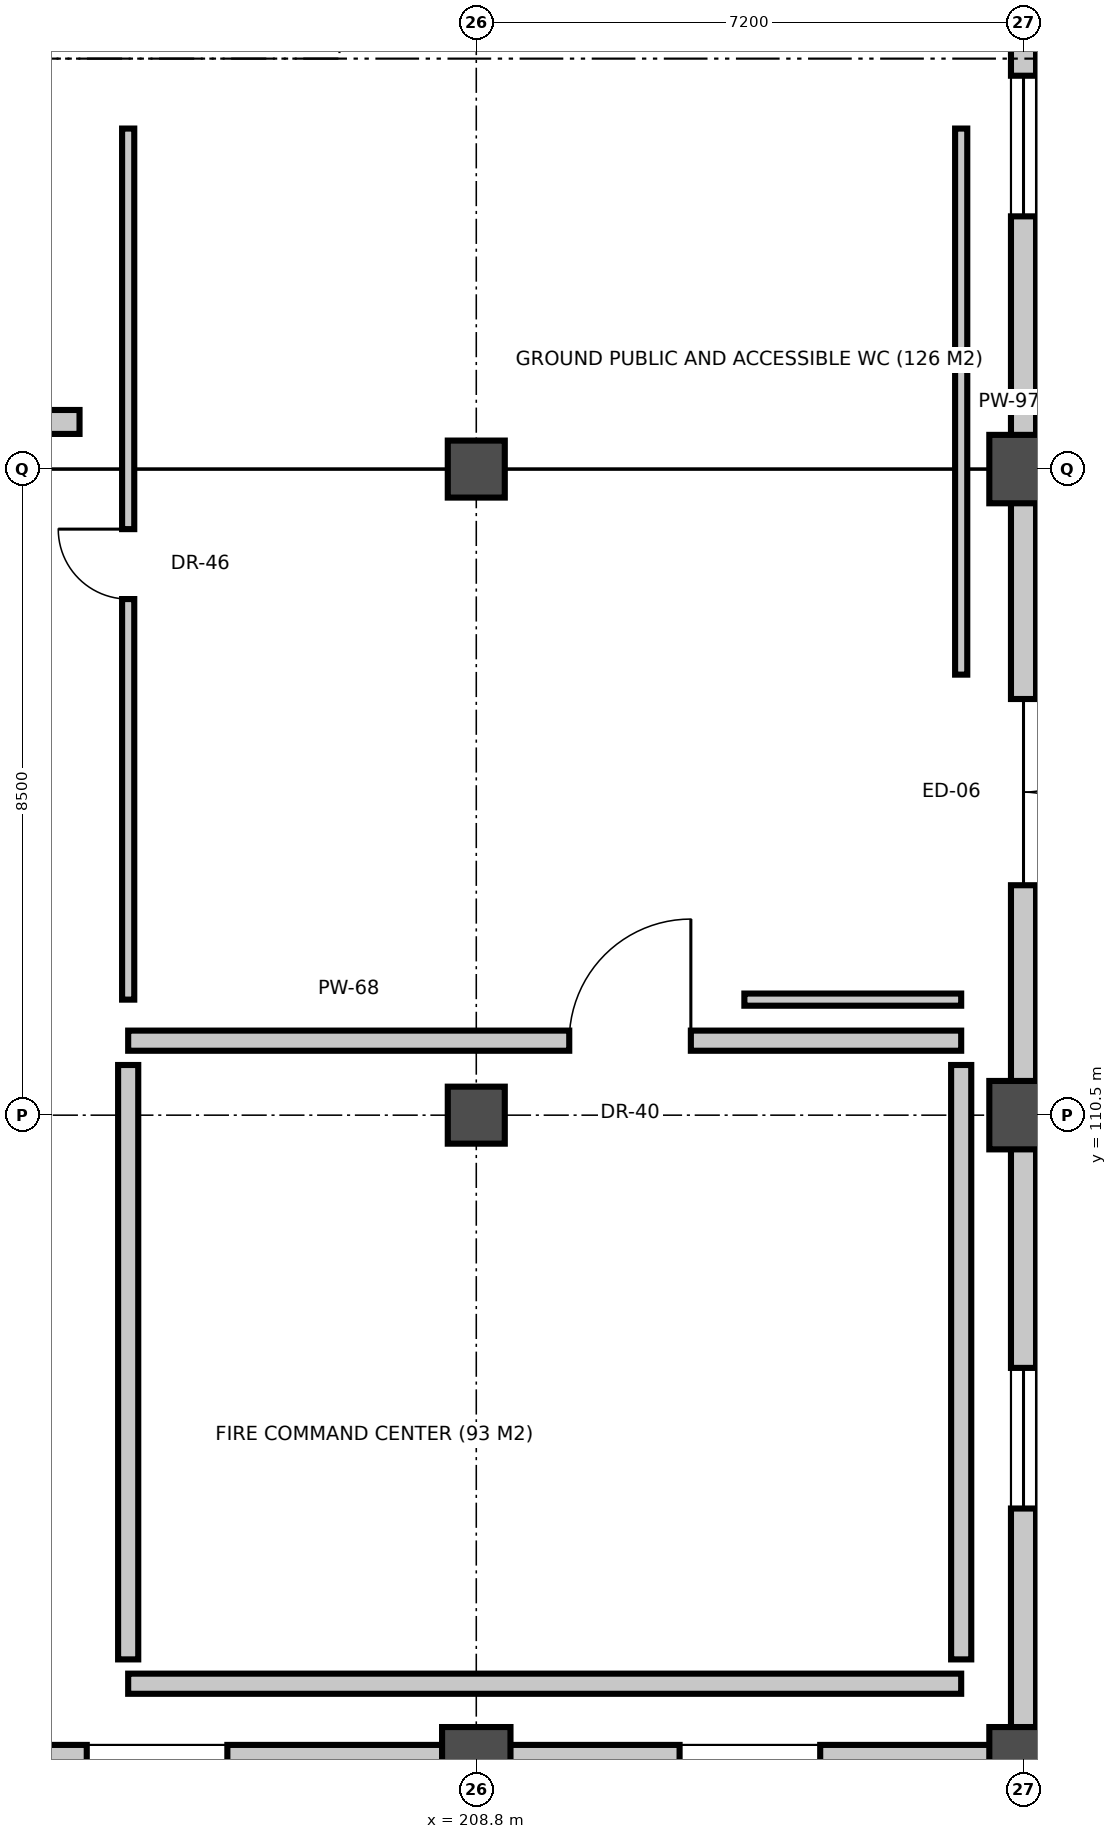
"""IFC4 building model, lengths in metres.
Left out: names, types, materials, properties, quantities, classifications, styles, units other than length and angle.
Written with IfcOpenShell. Run it as: python <this file> out.ifc"""

import sys

from ifc_helpers import new_model, si_unit, direction, frame, frame_2d, origin, origin_2d, place, context, subcontext, project, spatial, rectangle, circle, extrude, element, fill, save


model = new_model("IFC4")
c1 = context("Model", 3, precision=1e-05, world=origin(), true_north=direction((0.0, 1.0)))
c2 = subcontext(c1, "Body", "Model", "MODEL_VIEW")
j1 = project(units=[si_unit("LENGTHUNIT", "METRE"), si_unit("PLANEANGLEUNIT", "RADIAN")], contexts=[c1])
p1 = place(None, origin())
s1 = spatial("IfcSite", under=j1, at=p1, CompositionType="ELEMENT")
p2 = place(p1, origin())
s2 = spatial("IfcBuilding", under=s1, at=p2, CompositionType="ELEMENT")
p3 = place(p2, origin())
s3 = spatial("IfcBuildingStorey", under=s2, at=p3, CompositionType="ELEMENT", Elevation=0.0)
p4 = place(p3, frame((208.8, 102.0, 0.0), z_axis=(0.0, 0.0, 1.0), x_axis=(1.0, 0.0, 0.0)))
e1 = element("IfcColumn", 1, at=p4, inside=s3, PredefinedType="COLUMN", context=c2, shape_type="SweptSolid", body=[
    extrude(circle(Radius=0.45, at=origin_2d()), origin(), (0.0, 0.0, 1.0), 5.4),
])
for number, where, z_axis, x_axis in (
    (2, (208.8, 110.5, 0.0), (0.0, 0.0, 1.0), (1.0, 0.0, 0.0)),
    (3, (208.8, 119.0, 0.0), (0.0, 0.0, 1.0), (1.0, 0.0, 0.0)),
):
    element("IfcColumn", number, at=place(p3, frame(where, z_axis=z_axis, x_axis=x_axis)), inside=s3, PredefinedType="COLUMN", context=c2, shape_type="SweptSolid", body=[
        extrude(rectangle(XDim=0.75, YDim=0.75, at=origin_2d()), origin(), (0.0, 0.0, 1.0), 5.4),
    ])
for number, where, z_axis, x_axis in (
    (4, (216.0, 102.0, 0.0), (0.0, 0.0, 1.0), (1.0, 0.0, 0.0)),
    (5, (216.0, 110.5, 0.0), (0.0, 0.0, 1.0), (1.0, 0.0, 0.0)),
    (6, (216.0, 119.0, 0.0), (0.0, 0.0, 1.0), (1.0, 0.0, 0.0)),
):
    element("IfcColumn", number, at=place(p3, frame(where, z_axis=z_axis, x_axis=x_axis)), inside=s3, PredefinedType="COLUMN", context=c2, shape_type="SweptSolid", body=[
        extrude(circle(Radius=0.45, at=origin_2d()), origin(), (0.0, 0.0, 1.0), 5.4),
    ])
p5 = place(p3, frame((216.0, 127.07, 0.0), z_axis=(0.0, 0.0, 1.0), x_axis=(0.0, -1.0, 0.0)))
e7 = element("IfcWall", 7, at=p5, inside=s3, PredefinedType="SOLIDWALL", context=c2, shape_type="SweptSolid", body=[
    extrude(rectangle(XDim=7.64, YDim=0.33, at=frame_2d((3.82, 0.0))), origin(), (0.0, 0.0, 1.0), 4.078),
])
p6 = place(p5, frame((2.895, 0.0, 1.0)))
e8 = element("IfcOpeningElement", 8, at=p6, cuts=e7, PredefinedType="OPENING", context=c2, shape_type="SweptSolid", body=[
    extrude(rectangle(XDim=1.85, YDim=2.1, at=frame_2d((0.925, 1.05))), frame((0.0, 0.175, 0.0), z_axis=(0.0, -1.0, 0.0), x_axis=(1.0, 0.0, 0.0)), (0.0, 0.0, 1.0), 0.35),
])
p7 = place(p3, frame((216.0, 110.07, 0.0), z_axis=(0.0, 0.0, 1.0), x_axis=(0.0, -1.0, 0.0)))
e9 = element("IfcWall", 9, at=p7, inside=s3, PredefinedType="SOLIDWALL", context=c2, shape_type="SweptSolid", body=[
    extrude(rectangle(XDim=7.64, YDim=0.33, at=frame_2d((3.82, 0.0))), origin(), (0.0, 0.0, 1.0), 4.285),
])
p8 = place(p7, frame((2.895, 0.0, 1.0)))
e10 = element("IfcOpeningElement", 10, at=p8, cuts=e9, PredefinedType="OPENING", context=c2, shape_type="SweptSolid", body=[
    extrude(rectangle(XDim=1.85, YDim=2.1, at=frame_2d((0.925, 1.05))), frame((0.0, 0.175, 0.0), z_axis=(0.0, -1.0, 0.0), x_axis=(1.0, 0.0, 0.0)), (0.0, 0.0, 1.0), 0.35),
])
p9 = place(p3, frame((216.0, 118.57, 0.0), z_axis=(0.0, 0.0, 1.0), x_axis=(0.0, -1.0, 0.0)))
e11 = element("IfcWall", 11, at=p9, inside=s3, PredefinedType="SOLIDWALL", context=c2, shape_type="SweptSolid", body=[
    extrude(rectangle(XDim=7.64, YDim=0.33, at=frame_2d((3.82, 0.0))), origin(), (0.0, 0.0, 1.0), 4.217),
])
p10 = place(p9, frame((2.595, 0.0, 0.0)))
e12 = element("IfcOpeningElement", 12, at=p10, cuts=e11, PredefinedType="OPENING", context=c2, shape_type="SweptSolid", body=[
    extrude(rectangle(XDim=2.45, YDim=2.42, at=frame_2d((1.225, 1.21))), frame((0.0, 0.175, 0.0), z_axis=(0.0, -1.0, 0.0), x_axis=(1.0, 0.0, 0.0)), (0.0, 0.0, 1.0), 0.35),
])
p11 = place(p3, frame((208.37, 102.0, 0.0), z_axis=(0.0, 0.0, 1.0), x_axis=(-1.0, 0.0, 0.0)))
e13 = element("IfcWall", 13, at=p11, inside=s3, PredefinedType="SOLIDWALL", context=c2, shape_type="SweptSolid", body=[
    extrude(rectangle(XDim=7.54, YDim=0.43, at=frame_2d((3.77, 0.0))), origin(), (0.0, 0.0, 1.0), 4.184),
])
p12 = place(p11, frame((2.845, 0.0, 1.0)))
e14 = element("IfcOpeningElement", 14, at=p12, cuts=e13, PredefinedType="OPENING", context=c2, shape_type="SweptSolid", body=[
    extrude(rectangle(XDim=1.85, YDim=2.1, at=frame_2d((0.925, 1.05))), frame((0.0, 0.225, 0.0), z_axis=(0.0, -1.0, 0.0), x_axis=(1.0, 0.0, 0.0)), (0.0, 0.0, 1.0), 0.45),
])
p13 = place(p3, frame((215.57, 102.0, 0.0), z_axis=(0.0, 0.0, 1.0), x_axis=(-1.0, 0.0, 0.0)))
e15 = element("IfcWall", 15, at=p13, inside=s3, PredefinedType="SOLIDWALL", context=c2, shape_type="SweptSolid", body=[
    extrude(rectangle(XDim=6.34, YDim=0.43, at=frame_2d((3.17, 0.0))), origin(), (0.0, 0.0, 1.0), 4.536),
])
p14 = place(p13, frame((2.245, 0.0, 1.0)))
e16 = element("IfcOpeningElement", 16, at=p14, cuts=e15, PredefinedType="OPENING", context=c2, shape_type="SweptSolid", body=[
    extrude(rectangle(XDim=1.85, YDim=2.1, at=frame_2d((0.925, 1.05))), frame((0.0, 0.225, 0.0), z_axis=(0.0, -1.0, 0.0), x_axis=(1.0, 0.0, 0.0)), (0.0, 0.0, 1.0), 0.45),
])
p15 = place(p3, frame((204.22, 111.48, 0.0), z_axis=(0.0, 0.0, 1.0), x_axis=(1.0, 0.0, 0.0)))
e17 = element("IfcWall", 17, at=p15, inside=s3, PredefinedType="PARTITIONING", context=c2, shape_type="SweptSolid", body=[
    extrude(rectangle(XDim=10.96, YDim=0.265, at=frame_2d((5.48, 0.0))), origin(), (0.0, 0.0, 1.0), 4.04),
])
p16 = place(p15, frame((5.803, 0.0, 0.0)))
e18 = element("IfcOpeningElement", 18, at=p16, cuts=e17, PredefinedType="OPENING", context=c2, shape_type="SweptSolid", body=[
    extrude(rectangle(XDim=1.6, YDim=2.3, at=frame_2d((0.8, 1.15))), frame((0.0, 0.142, 0.0), z_axis=(0.0, -1.0, 0.0), x_axis=(1.0, 0.0, 0.0)), (0.0, 0.0, 1.0), 0.285),
])
p17 = place(p3, frame((215.18, 103.02, 0.0), z_axis=(0.0, 0.0, 1.0), x_axis=(-1.0, 0.0, 0.0)))
e19 = element("IfcWall", 19, at=p17, inside=s3, PredefinedType="PARTITIONING", context=c2, shape_type="SweptSolid", body=[
    extrude(rectangle(XDim=10.96, YDim=0.265, at=frame_2d((5.48, 0.0))), origin(), (0.0, 0.0, 1.0), 4.04),
])
for number, where, z_axis, x_axis in (
    (20, (215.18, 111.16, 0.0), (0.0, 0.0, 1.0), (0.0, -1.0, 0.0)),
    (21, (204.22, 103.34, 0.0), (0.0, 0.0, 1.0), (0.0, 1.0, 0.0)),
):
    element("IfcWall", number, at=place(p3, frame(where, z_axis=z_axis, x_axis=x_axis)), inside=s3, PredefinedType="PARTITIONING", context=c2, shape_type="SweptSolid", body=[
        extrude(rectangle(XDim=7.82, YDim=0.265, at=frame_2d((3.91, 0.0))), origin(), (0.0, 0.0, 1.0), 4.04),
    ])
p18 = place(p3, frame((203.58, 119.62, 0.0), z_axis=(0.0, 0.0, 1.0), x_axis=(-1.0, 0.0, 0.0)))
e22 = element("IfcWall", 22, at=p18, inside=s3, PredefinedType="PARTITIONING", context=c2, shape_type="SweptSolid", body=[
    extrude(rectangle(XDim=2.48, YDim=0.315, at=frame_2d((1.24, 0.0))), origin(), (0.0, 0.0, 1.0), 4.04),
])
p19 = place(p18, frame((0.78, 0.0, 0.0)))
e23 = element("IfcOpeningElement", 23, at=p19, cuts=e22, PredefinedType="OPENING", context=c2, shape_type="SweptSolid", body=[
    extrude(rectangle(XDim=0.92, YDim=2.12, at=frame_2d((0.46, 1.06))), frame((0.0, 0.167, 0.0), z_axis=(0.0, -1.0, 0.0), x_axis=(1.0, 0.0, 0.0)), (0.0, 0.0, 1.0), 0.335),
])
p20 = place(p3, frame((215.18, 123.48, 0.0), z_axis=(0.0, 0.0, 1.0), x_axis=(0.0, -1.0, 0.0)))
e24 = element("IfcWall", 24, at=p20, inside=s3, PredefinedType="PARTITIONING", context=c2, shape_type="SweptSolid", body=[
    extrude(rectangle(XDim=7.184, YDim=0.16, at=frame_2d((3.592, 0.0))), origin(), (0.0, 0.0, 1.0), 4.04),
])
p21 = place(p3, frame((204.22, 112.02, 0.0), z_axis=(0.0, 0.0, 1.0), x_axis=(0.0, 1.0, 0.0)))
e25 = element("IfcWall", 25, at=p21, inside=s3, PredefinedType="PARTITIONING", context=c2, shape_type="SweptSolid", body=[
    extrude(rectangle(XDim=11.46, YDim=0.16, at=frame_2d((5.73, 0.0))), origin(), (0.0, 0.0, 1.0), 4.04),
])
p22 = place(p21, frame((5.27, 0.0, 0.0)))
e26 = element("IfcOpeningElement", 26, at=p22, cuts=e25, PredefinedType="OPENING", context=c2, shape_type="SweptSolid", body=[
    extrude(rectangle(XDim=0.92, YDim=2.12, at=frame_2d((0.46, 1.06))), frame((0.0, 0.09, 0.0), z_axis=(0.0, -1.0, 0.0), x_axis=(1.0, 0.0, 0.0)), (0.0, 0.0, 1.0), 0.18),
])
p23 = place(p3, frame((215.18, 112.02, 0.0), z_axis=(0.0, 0.0, 1.0), x_axis=(-1.0, 0.0, 0.0)))
e27 = element("IfcWall", 27, at=p23, inside=s3, PredefinedType="PARTITIONING", context=c2, shape_type="SweptSolid", body=[
    extrude(rectangle(XDim=2.853, YDim=0.16, at=frame_2d((1.426, 0.0))), origin(), (0.0, 0.0, 1.0), 4.04),
])
p24 = place(p6, origin())
e28 = element("IfcWindow", 28, at=p24, inside=s3, PartitioningType="SINGLE_PANEL", PredefinedType="WINDOW", context=c2, shape_type="SweptSolid", body=[
    extrude(rectangle(XDim=1.85, YDim=2.1, at=frame_2d((0.925, 1.05))), frame((0.0, 0.03, 0.0), z_axis=(0.0, -1.0, 0.0), x_axis=(1.0, 0.0, 0.0)), (0.0, 0.0, 1.0), 0.06),
])
fill(e8, e28)
p25 = place(p8, origin())
e29 = element("IfcWindow", 29, at=p25, inside=s3, PartitioningType="SINGLE_PANEL", PredefinedType="WINDOW", context=c2, shape_type="SweptSolid", body=[
    extrude(rectangle(XDim=1.85, YDim=2.1, at=frame_2d((0.925, 1.05))), frame((0.0, 0.03, 0.0), z_axis=(0.0, -1.0, 0.0), x_axis=(1.0, 0.0, 0.0)), (0.0, 0.0, 1.0), 0.06),
])
fill(e10, e29)
p26 = place(p10, origin())
e30 = element("IfcDoor", 30, at=p26, inside=s3, OperationType="DOUBLE_DOOR_SINGLE_SWING", PredefinedType="DOOR", context=c2, shape_type="SweptSolid", body=[
    extrude(rectangle(XDim=2.45, YDim=2.42, at=frame_2d((1.225, 1.21))), frame((0.0, 0.025, 0.0), z_axis=(0.0, -1.0, 0.0), x_axis=(1.0, 0.0, 0.0)), (0.0, 0.0, 1.0), 0.05),
])
fill(e12, e30)
p27 = place(p12, origin())
e31 = element("IfcWindow", 31, at=p27, inside=s3, PartitioningType="SINGLE_PANEL", PredefinedType="WINDOW", context=c2, shape_type="SweptSolid", body=[
    extrude(rectangle(XDim=1.85, YDim=2.1, at=frame_2d((0.925, 1.05))), frame((0.0, 0.03, 0.0), z_axis=(0.0, -1.0, 0.0), x_axis=(1.0, 0.0, 0.0)), (0.0, 0.0, 1.0), 0.06),
])
fill(e14, e31)
p28 = place(p14, origin())
e32 = element("IfcWindow", 32, at=p28, inside=s3, PartitioningType="SINGLE_PANEL", PredefinedType="WINDOW", context=c2, shape_type="SweptSolid", body=[
    extrude(rectangle(XDim=1.85, YDim=2.1, at=frame_2d((0.925, 1.05))), frame((0.0, 0.03, 0.0), z_axis=(0.0, -1.0, 0.0), x_axis=(1.0, 0.0, 0.0)), (0.0, 0.0, 1.0), 0.06),
])
fill(e16, e32)
p29 = place(p16, origin())
e33 = element("IfcDoor", 33, at=p29, inside=s3, OperationType="SINGLE_SWING_RIGHT", PredefinedType="DOOR", context=c2, shape_type="SweptSolid", body=[
    extrude(rectangle(XDim=1.6, YDim=2.3, at=frame_2d((0.8, 1.15))), frame((0.0, 0.025, 0.0), z_axis=(0.0, -1.0, 0.0), x_axis=(1.0, 0.0, 0.0)), (0.0, 0.0, 1.0), 0.05),
])
fill(e18, e33)
p30 = place(p22, origin())
e34 = element("IfcDoor", 34, at=p30, inside=s3, OperationType="SINGLE_SWING_RIGHT", PredefinedType="DOOR", context=c2, shape_type="SweptSolid", body=[
    extrude(rectangle(XDim=0.92, YDim=2.12, at=frame_2d((0.46, 1.06))), frame((0.0, 0.025, 0.0), z_axis=(0.0, -1.0, 0.0), x_axis=(1.0, 0.0, 0.0)), (0.0, 0.0, 1.0), 0.05),
])
fill(e26, e34)
save(model, sys.argv[1])
